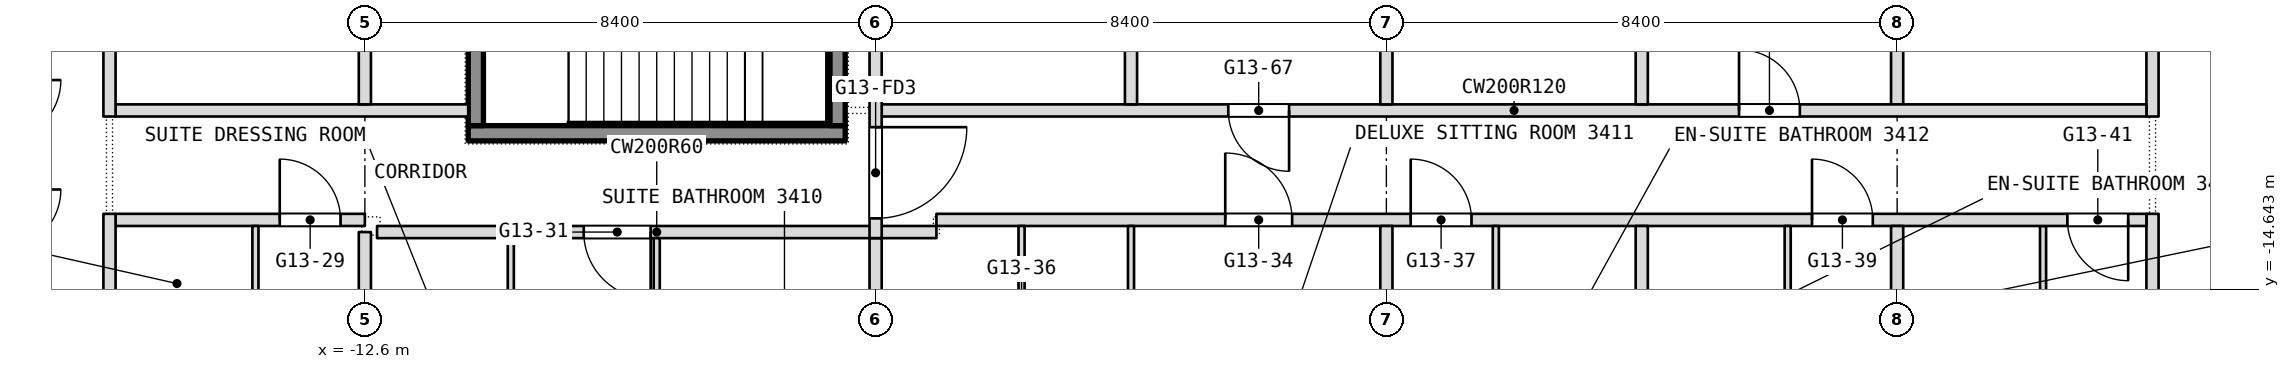
"""IFC4 building model, lengths in metres.
Left out: names, types, materials, properties, quantities, classifications, styles, units other than length and angle.
Written with IfcOpenShell. Run it as: python <this file> out.ifc"""

import sys

from ifc_helpers import new_model, si_unit, direction, frame, frame_2d, origin, place, context, subcontext, project, spatial, rectangle, extrude, element, fill, save


model = new_model("IFC4")
c1 = context("Model", 3, precision=1e-05, world=origin(), true_north=direction((0.0, 1.0)))
c2 = subcontext(c1, "Body", "Model", "MODEL_VIEW")
j1 = project(units=[si_unit("LENGTHUNIT", "METRE"), si_unit("PLANEANGLEUNIT", "RADIAN")], contexts=[c1])
p1 = place(None, origin())
s1 = spatial("IfcSite", under=j1, at=p1, CompositionType="ELEMENT")
p2 = place(p1, origin())
s2 = spatial("IfcBuilding", under=s1, at=p2, CompositionType="ELEMENT")
p3 = place(p2, frame((0.0, 0.0, 148.1)))
s3 = spatial("IfcBuildingStorey", under=s2, at=p3, CompositionType="ELEMENT", Elevation=148.1)
p4 = place(p3, frame((16.8, -22.186, 0.0), z_axis=(0.0, 0.0, 1.0), x_axis=(0.0, 1.0, 0.0)))
e1 = element("IfcWall", 1, at=p4, inside=s3, PredefinedType="PARTITIONING", context=c2, shape_type="SweptSolid", body=[
    extrude(rectangle(XDim=8.786, YDim=0.2, at=frame_2d((4.393, 0.0))), origin(), (0.0, 0.0, 1.0), 3.34),
])
p5 = place(p3, frame((16.8, -11.8, 0.0), z_axis=(0.0, 0.0, 1.0), x_axis=(0.0, 1.0, 0.0)))
e2 = element("IfcWall", 2, at=p5, inside=s3, PredefinedType="PARTITIONING", context=c2, shape_type="SweptSolid", body=[
    extrude(rectangle(XDim=9.9, YDim=0.2, at=frame_2d((4.95, 0.0))), origin(), (0.0, 0.0, 1.0), 3.34),
])
p6 = place(p3, frame((15.0, -16.85, 0.0), z_axis=(0.0, 0.0, 1.0), x_axis=(0.0, 1.0, 0.0)))
e3 = element("IfcWall", 3, at=p6, inside=s3, PredefinedType="PARTITIONING", context=c2, shape_type="SweptSolid", body=[
    extrude(rectangle(XDim=3.25, YDim=0.1, at=frame_2d((1.625, 0.0))), origin(), (0.0, 0.0, 1.0), 3.34),
])
p7 = place(p3, frame((-12.4, -13.7, 0.0), z_axis=(0.0, 0.0, 1.0), x_axis=(1.0, 0.0, 0.0)))
e4 = element("IfcWall", 4, at=p7, inside=s3, PredefinedType="PARTITIONING", context=c2, shape_type="SweptSolid", body=[
    extrude(rectangle(XDim=9.2, YDim=0.2, at=frame_2d((4.6, 0.0))), origin(), (0.0, 0.0, 1.0), 3.34),
])
p8 = place(p7, frame((3.4, 0.0, 0.0)))
e5 = element("IfcOpeningElement", 5, at=p8, cuts=e4, PredefinedType="OPENING", context=c2, shape_type="SweptSolid", body=[
    extrude(rectangle(XDim=1.1, YDim=2.1, at=frame_2d((0.55, 1.05))), frame((0.0, 0.1, 0.0), z_axis=(0.0, -1.0, 0.0), x_axis=(1.0, 0.0, 0.0)), (0.0, 0.0, 1.0), 0.2),
])
p9 = place(p3, frame((-16.7, -13.5, 0.0), z_axis=(0.0, 0.0, 1.0), x_axis=(1.0, 0.0, 0.0)))
e6 = element("IfcWall", 6, at=p9, inside=s3, PredefinedType="PARTITIONING", context=c2, shape_type="SweptSolid", body=[
    extrude(rectangle(XDim=4.1, YDim=0.2, at=frame_2d((2.05, 0.0))), origin(), (0.0, 0.0, 1.0), 3.34),
])
p10 = place(p9, frame((2.7, 0.0, 0.0)))
e7 = element("IfcOpeningElement", 7, at=p10, cuts=e6, PredefinedType="OPENING", context=c2, shape_type="SweptSolid", body=[
    extrude(rectangle(XDim=1.0, YDim=2.1, at=frame_2d((0.5, 1.05))), frame((0.0, 0.1, 0.0), z_axis=(0.0, -1.0, 0.0), x_axis=(1.0, 0.0, 0.0)), (0.0, 0.0, 1.0), 0.2),
])
p11 = place(p3, frame((-3.2, -13.5, 0.0), z_axis=(0.0, 0.0, 1.0), x_axis=(1.0, 0.0, 0.0)))
e8 = element("IfcWall", 8, at=p11, inside=s3, PredefinedType="PARTITIONING", context=c2, shape_type="SweptSolid", body=[
    extrude(rectangle(XDim=19.9, YDim=0.2, at=frame_2d((9.95, 0.0))), origin(), (0.0, 0.0, 1.0), 3.34),
])
p12 = place(p11, frame((4.75, 0.0, 0.0)))
e9 = element("IfcOpeningElement", 9, at=p12, cuts=e8, PredefinedType="OPENING", context=c2, shape_type="SweptSolid", body=[
    extrude(rectangle(XDim=1.1, YDim=2.1, at=frame_2d((0.55, 1.05))), frame((0.0, 0.1, 0.0), z_axis=(0.0, -1.0, 0.0), x_axis=(1.0, 0.0, 0.0)), (0.0, 0.0, 1.0), 0.2),
])
p13 = place(p11, frame((7.8, 0.0, 0.0)))
e10 = element("IfcOpeningElement", 10, at=p13, cuts=e8, PredefinedType="OPENING", context=c2, shape_type="SweptSolid", body=[
    extrude(rectangle(XDim=1.0, YDim=2.1, at=frame_2d((0.5, 1.05))), frame((0.0, 0.1, 0.0), z_axis=(0.0, -1.0, 0.0), x_axis=(1.0, 0.0, 0.0)), (0.0, 0.0, 1.0), 0.2),
])
p14 = place(p11, frame((14.4, 0.0, 0.0)))
e11 = element("IfcOpeningElement", 11, at=p14, cuts=e8, PredefinedType="OPENING", context=c2, shape_type="SweptSolid", body=[
    extrude(rectangle(XDim=1.0, YDim=2.1, at=frame_2d((0.5, 1.05))), frame((0.0, 0.1, 0.0), z_axis=(0.0, -1.0, 0.0), x_axis=(1.0, 0.0, 0.0)), (0.0, 0.0, 1.0), 0.2),
])
p15 = place(p11, frame((18.6, 0.0, 0.0)))
e12 = element("IfcOpeningElement", 12, at=p15, cuts=e8, PredefinedType="OPENING", context=c2, shape_type="SweptSolid", body=[
    extrude(rectangle(XDim=1.0, YDim=2.1, at=frame_2d((0.5, 1.05))), frame((0.0, 0.1, 0.0), z_axis=(0.0, -1.0, 0.0), x_axis=(1.0, 0.0, 0.0)), (0.0, 0.0, 1.0), 0.2),
])
p16 = place(p3, frame((12.6, -21.175, 0.0), z_axis=(0.0, 0.0, 1.0), x_axis=(0.0, 1.0, 0.0)))
e13 = element("IfcWall", 13, at=p16, inside=s3, PredefinedType="PARTITIONING", context=c2, shape_type="SweptSolid", body=[
    extrude(rectangle(XDim=7.575, YDim=0.2, at=frame_2d((3.788, 0.0))), origin(), (0.0, 0.0, 1.0), 3.34),
])
p17 = place(p3, frame((12.6, -11.6, 0.0), z_axis=(0.0, 0.0, 1.0), x_axis=(0.0, 1.0, 0.0)))
e14 = element("IfcWall", 14, at=p17, inside=s3, PredefinedType="PARTITIONING", context=c2, shape_type="SweptSolid", body=[
    extrude(rectangle(XDim=3.9, YDim=0.2, at=frame_2d((1.95, 0.0))), origin(), (0.0, 0.0, 1.0), 3.34),
])
p18 = place(p3, frame((-16.7, -11.7, 0.0), z_axis=(0.0, 0.0, 1.0), x_axis=(1.0, 0.0, 0.0)))
e15 = element("IfcWall", 15, at=p18, inside=s3, PredefinedType="PARTITIONING", context=c2, shape_type="SweptSolid", body=[
    extrude(rectangle(XDim=5.8, YDim=0.2, at=frame_2d((2.9, 0.0))), origin(), (0.0, 0.0, 1.0), 3.34),
])
p19 = place(p3, frame((-4.1, -11.7, 0.0), z_axis=(0.0, 0.0, 1.0), x_axis=(1.0, 0.0, 0.0)))
e16 = element("IfcWall", 16, at=p19, inside=s3, PredefinedType="PARTITIONING", context=c2, shape_type="SweptSolid", body=[
    extrude(rectangle(XDim=20.8, YDim=0.2, at=frame_2d((10.4, 0.0))), origin(), (0.0, 0.0, 1.0), 3.34),
])
p20 = place(p19, frame((14.1, 0.0, 0.0)))
e17 = element("IfcOpeningElement", 17, at=p20, cuts=e16, PredefinedType="OPENING", context=c2, shape_type="SweptSolid", body=[
    extrude(rectangle(XDim=1.0, YDim=2.1, at=frame_2d((0.5, 1.05))), frame((0.0, 0.1, 0.0), z_axis=(0.0, -1.0, 0.0), x_axis=(1.0, 0.0, 0.0)), (0.0, 0.0, 1.0), 0.2),
])
p21 = place(p19, frame((5.7, 0.0, 0.0)))
e18 = element("IfcOpeningElement", 18, at=p21, cuts=e16, PredefinedType="OPENING", context=c2, shape_type="SweptSolid", body=[
    extrude(rectangle(XDim=1.0, YDim=2.1, at=frame_2d((0.5, 1.05))), frame((0.0, 0.1, 0.0), z_axis=(0.0, -1.0, 0.0), x_axis=(1.0, 0.0, 0.0)), (0.0, 0.0, 1.0), 0.2),
])
p22 = place(p3, frame((10.8, -17.65, 0.0), z_axis=(0.0, 0.0, 1.0), x_axis=(0.0, 1.0, 0.0)))
e19 = element("IfcWall", 19, at=p22, inside=s3, PredefinedType="PARTITIONING", context=c2, shape_type="SweptSolid", body=[
    extrude(rectangle(XDim=4.05, YDim=0.1, at=frame_2d((2.025, 0.0))), origin(), (0.0, 0.0, 1.0), 3.34),
])
p23 = place(p3, frame((8.4, -23.3, 0.0), z_axis=(0.0, 0.0, 1.0), x_axis=(0.0, 1.0, 0.0)))
e20 = element("IfcWall", 20, at=p23, inside=s3, PredefinedType="PARTITIONING", context=c2, shape_type="SweptSolid", body=[
    extrude(rectangle(XDim=9.7, YDim=0.2, at=frame_2d((4.85, 0.0))), origin(), (0.0, 0.0, 1.0), 3.34),
])
p24 = place(p3, frame((8.4, -11.6, 0.0), z_axis=(0.0, 0.0, 1.0), x_axis=(0.0, 1.0, 0.0)))
e21 = element("IfcWall", 21, at=p24, inside=s3, PredefinedType="PARTITIONING", context=c2, shape_type="SweptSolid", body=[
    extrude(rectangle(XDim=3.8, YDim=0.2, at=frame_2d((1.9, 0.0))), origin(), (0.0, 0.0, 1.0), 3.34),
])
p25 = place(p3, frame((6.0, -17.75, 0.0), z_axis=(0.0, 0.0, 1.0), x_axis=(0.0, 1.0, 0.0)))
e22 = element("IfcWall", 22, at=p25, inside=s3, PredefinedType="PARTITIONING", context=c2, shape_type="SweptSolid", body=[
    extrude(rectangle(XDim=4.15, YDim=0.1, at=frame_2d((2.075, 0.0))), origin(), (0.0, 0.0, 1.0), 3.34),
])
p26 = place(p3, frame((4.2, -23.3, 0.0), z_axis=(0.0, 0.0, 1.0), x_axis=(0.0, 1.0, 0.0)))
e23 = element("IfcWall", 23, at=p26, inside=s3, PredefinedType="PARTITIONING", context=c2, shape_type="SweptSolid", body=[
    extrude(rectangle(XDim=9.7, YDim=0.2, at=frame_2d((4.85, 0.0))), origin(), (0.0, 0.0, 1.0), 3.34),
])
p27 = place(p3, frame((4.2, -11.6, 0.0), z_axis=(0.0, 0.0, 1.0), x_axis=(0.0, 1.0, 0.0)))
e24 = element("IfcWall", 24, at=p27, inside=s3, PredefinedType="PARTITIONING", context=c2, shape_type="SweptSolid", body=[
    extrude(rectangle(XDim=9.7, YDim=0.2, at=frame_2d((4.85, 0.0))), origin(), (0.0, 0.0, 1.0), 3.34),
])
p28 = place(p3, frame((0.0, -23.3, 0.0), z_axis=(0.0, 0.0, 1.0), x_axis=(0.0, 1.0, 0.0)))
e25 = element("IfcWall", 25, at=p28, inside=s3, PredefinedType="PARTITIONING", context=c2, shape_type="SweptSolid", body=[
    extrude(rectangle(XDim=9.7, YDim=0.1, at=frame_2d((4.85, 0.0))), origin(), (0.0, 0.0, 1.0), 3.34),
])
p29 = place(p28, frame((3.65, 0.0, 0.0)))
e26 = element("IfcOpeningElement", 26, at=p29, cuts=e25, PredefinedType="OPENING", context=c2, shape_type="SweptSolid", body=[
    extrude(rectangle(XDim=0.9, YDim=2.1, at=frame_2d((0.45, 1.05))), frame((0.0, 0.05, 0.0), z_axis=(0.0, -1.0, 0.0), x_axis=(1.0, 0.0, 0.0)), (0.0, 0.0, 1.0), 0.1),
])
p30 = place(p3, frame((0.0, -11.6, 0.0), z_axis=(0.0, 0.0, 1.0), x_axis=(0.0, 1.0, 0.0)))
e27 = element("IfcWall", 27, at=p30, inside=s3, PredefinedType="PARTITIONING", context=c2, shape_type="SweptSolid", body=[
    extrude(rectangle(XDim=9.7, YDim=0.2, at=frame_2d((4.85, 0.0))), origin(), (0.0, 0.0, 1.0), 3.34),
])
p31 = place(p3, frame((-1.8, -17.05, 0.0), z_axis=(0.0, 0.0, 1.0), x_axis=(0.0, 1.0, 0.0)))
e28 = element("IfcWall", 28, at=p31, inside=s3, PredefinedType="PARTITIONING", context=c2, shape_type="SweptSolid", body=[
    extrude(rectangle(XDim=3.45, YDim=0.1, at=frame_2d((1.725, 0.0))), origin(), (0.0, 0.0, 1.0), 3.34),
])
p32 = place(p31, frame((1.3, 0.0, 0.0)))
e29 = element("IfcOpeningElement", 29, at=p32, cuts=e28, PredefinedType="OPENING", context=c2, shape_type="SweptSolid", body=[
    extrude(rectangle(XDim=0.9, YDim=2.1, at=frame_2d((0.45, 1.05))), frame((0.0, 0.05, 0.0), z_axis=(0.0, -1.0, 0.0), x_axis=(1.0, 0.0, 0.0)), (0.0, 0.0, 1.0), 0.1),
])
p33 = place(p3, frame((-4.2, -23.3, 0.0), z_axis=(0.0, 0.0, 1.0), x_axis=(0.0, 1.0, 0.0)))
e30 = element("IfcWall", 30, at=p33, inside=s3, PredefinedType="PARTITIONING", context=c2, shape_type="SweptSolid", body=[
    extrude(rectangle(XDim=9.5, YDim=0.2, at=frame_2d((4.75, 0.0))), origin(), (0.0, 0.0, 1.0), 3.34),
])
p34 = place(p3, frame((-4.2, -13.8, 0.0), z_axis=(0.0, 0.0, 1.0), x_axis=(0.0, 1.0, 0.0)))
e31 = element("IfcWall", 31, at=p34, inside=s3, PredefinedType="PARTITIONING", context=c2, shape_type="SweptSolid", body=[
    extrude(rectangle(XDim=13.8, YDim=0.2, at=frame_2d((6.9, 0.0))), origin(), (0.0, 0.0, 1.0), 3.34),
])
p35 = place(p34, frame((12.15, 0.0, 0.0)))
e32 = element("IfcOpeningElement", 32, at=p35, cuts=e31, PredefinedType="OPENING", context=c2, shape_type="SweptSolid", body=[
    extrude(rectangle(XDim=1.5, YDim=2.1, at=frame_2d((0.75, 1.05))), frame((0.0, 0.1, 0.0), z_axis=(0.0, -1.0, 0.0), x_axis=(1.0, 0.0, 0.0)), (0.0, 0.0, 1.0), 0.2),
])
p36 = place(p34, frame((0.325, 0.0, 0.0)))
e33 = element("IfcOpeningElement", 33, at=p36, cuts=e31, PredefinedType="OPENING", context=c2, shape_type="SweptSolid", body=[
    extrude(rectangle(XDim=1.5, YDim=2.1, at=frame_2d((0.75, 1.05))), frame((0.0, 0.1, 0.0), z_axis=(0.0, -1.0, 0.0), x_axis=(1.0, 0.0, 0.0)), (0.0, 0.0, 1.0), 0.2),
])
p37 = place(p3, frame((-7.8, -17.35, 0.0), z_axis=(0.0, 0.0, 1.0), x_axis=(0.0, 1.0, 0.0)))
e34 = element("IfcWall", 34, at=p37, inside=s3, PredefinedType="PARTITIONING", context=c2, shape_type="SweptSolid", body=[
    extrude(rectangle(XDim=3.55, YDim=0.1, at=frame_2d((1.775, 0.0))), origin(), (0.0, 0.0, 1.0), 3.34),
])
p38 = place(p3, frame((-10.2, -17.25, 0.0), z_axis=(0.0, 0.0, 1.0), x_axis=(0.0, 1.0, 0.0)))
e35 = element("IfcWall", 35, at=p38, inside=s3, PredefinedType="PARTITIONING", context=c2, shape_type="SweptSolid", body=[
    extrude(rectangle(XDim=3.45, YDim=0.1, at=frame_2d((1.725, 0.0))), origin(), (0.0, 0.0, 1.0), 3.34),
])
p39 = place(p3, frame((-12.6, -21.175, 0.0), z_axis=(0.0, 0.0, 1.0), x_axis=(0.0, 1.0, 0.0)))
e36 = element("IfcWall", 36, at=p39, inside=s3, PredefinedType="PARTITIONING", context=c2, shape_type="SweptSolid", body=[
    extrude(rectangle(XDim=7.475, YDim=0.2, at=frame_2d((3.738, 0.0))), origin(), (0.0, 0.0, 1.0), 3.34),
])
p40 = place(p3, frame((-12.6, -11.6, 0.0), z_axis=(0.0, 0.0, 1.0), x_axis=(0.0, 1.0, 0.0)))
e37 = element("IfcWall", 37, at=p40, inside=s3, PredefinedType="PARTITIONING", context=c2, shape_type="SweptSolid", body=[
    extrude(rectangle(XDim=9.7, YDim=0.2, at=frame_2d((4.85, 0.0))), origin(), (0.0, 0.0, 1.0), 3.34),
])
p41 = place(p3, frame((-14.4, -16.45, 0.0), z_axis=(0.0, 0.0, 1.0), x_axis=(0.0, 1.0, 0.0)))
e38 = element("IfcWall", 38, at=p41, inside=s3, PredefinedType="PARTITIONING", context=c2, shape_type="SweptSolid", body=[
    extrude(rectangle(XDim=2.85, YDim=0.1, at=frame_2d((1.425, 0.0))), origin(), (0.0, 0.0, 1.0), 3.34),
])
p42 = place(p3, frame((-16.8, -22.186, 0.0), z_axis=(0.0, 0.0, 1.0), x_axis=(0.0, 1.0, 0.0)))
e39 = element("IfcWall", 39, at=p42, inside=s3, PredefinedType="PARTITIONING", context=c2, shape_type="SweptSolid", body=[
    extrude(rectangle(XDim=8.786, YDim=0.2, at=frame_2d((4.393, 0.0))), origin(), (0.0, 0.0, 1.0), 3.34),
])
p43 = place(p3, frame((-16.8, -11.8, 0.0), z_axis=(0.0, 0.0, 1.0), x_axis=(0.0, 1.0, 0.0)))
e40 = element("IfcWall", 40, at=p43, inside=s3, PredefinedType="PARTITIONING", context=c2, shape_type="SweptSolid", body=[
    extrude(rectangle(XDim=9.9, YDim=0.2, at=frame_2d((4.95, 0.0))), origin(), (0.0, 0.0, 1.0), 3.34),
])
p44 = place(p3, frame((-10.9, -12.075, 0.1), z_axis=(0.0, 0.0, 1.0), x_axis=(1.0, 0.0, 0.0)))
e41 = element("IfcWall", 41, at=p44, inside=s3, PredefinedType="SHEAR", context=c2, shape_type="SweptSolid", body=[
    extrude(rectangle(XDim=6.2, YDim=0.25, at=frame_2d((3.1, 0.0))), origin(), (0.0, 0.0, 1.0), 3.6),
])
for number, where, z_axis, x_axis in (
    (42, (-10.775, -11.95, 0.1), (0.0, 0.0, 1.0), (0.0, 1.0, 0.0)),
    (43, (-4.825, -11.95, 0.1), (0.0, 0.0, 1.0), (0.0, 1.0, 0.0)),
):
    element("IfcWall", number, at=place(p3, frame(where, z_axis=z_axis, x_axis=x_axis)), inside=s3, PredefinedType="SHEAR", context=c2, shape_type="SweptSolid", body=[
        extrude(rectangle(XDim=2.9, YDim=0.25, at=frame_2d((1.45, 0.0))), origin(), (0.0, 0.0, 1.0), 3.6),
    ])
p45 = place(p8, origin())
e44 = element("IfcDoor", 44, at=p45, inside=s3, OperationType="SINGLE_SWING_LEFT", PredefinedType="DOOR", context=c2, shape_type="SweptSolid", body=[
    extrude(rectangle(XDim=1.1, YDim=2.1, at=frame_2d((0.55, 1.05))), frame((0.0, 0.025, 0.0), z_axis=(0.0, -1.0, 0.0), x_axis=(1.0, 0.0, 0.0)), (0.0, 0.0, 1.0), 0.05),
])
fill(e5, e44)
p46 = place(p10, origin())
e45 = element("IfcDoor", 45, at=p46, inside=s3, OperationType="SINGLE_SWING_LEFT", PredefinedType="DOOR", context=c2, shape_type="SweptSolid", body=[
    extrude(rectangle(XDim=1.0, YDim=2.1, at=frame_2d((0.5, 1.05))), frame((0.0, 0.025, 0.0), z_axis=(0.0, -1.0, 0.0), x_axis=(1.0, 0.0, 0.0)), (0.0, 0.0, 1.0), 0.05),
])
fill(e7, e45)
p47 = place(p12, origin())
e46 = element("IfcDoor", 46, at=p47, inside=s3, OperationType="SINGLE_SWING_RIGHT", PredefinedType="DOOR", context=c2, shape_type="SweptSolid", body=[
    extrude(rectangle(XDim=1.1, YDim=2.1, at=frame_2d((0.55, 1.05))), frame((0.0, 0.025, 0.0), z_axis=(0.0, -1.0, 0.0), x_axis=(1.0, 0.0, 0.0)), (0.0, 0.0, 1.0), 0.05),
])
fill(e9, e46)
p48 = place(p13, origin())
e47 = element("IfcDoor", 47, at=p48, inside=s3, OperationType="SINGLE_SWING_LEFT", PredefinedType="DOOR", context=c2, shape_type="SweptSolid", body=[
    extrude(rectangle(XDim=1.0, YDim=2.1, at=frame_2d((0.5, 1.05))), frame((0.0, 0.025, 0.0), z_axis=(0.0, -1.0, 0.0), x_axis=(1.0, 0.0, 0.0)), (0.0, 0.0, 1.0), 0.05),
])
fill(e10, e47)
p49 = place(p14, origin())
e48 = element("IfcDoor", 48, at=p49, inside=s3, OperationType="SINGLE_SWING_LEFT", PredefinedType="DOOR", context=c2, shape_type="SweptSolid", body=[
    extrude(rectangle(XDim=1.0, YDim=2.1, at=frame_2d((0.5, 1.05))), frame((0.0, 0.025, 0.0), z_axis=(0.0, -1.0, 0.0), x_axis=(1.0, 0.0, 0.0)), (0.0, 0.0, 1.0), 0.05),
])
fill(e11, e48)
p50 = place(p15, origin())
e49 = element("IfcDoor", 49, at=p50, inside=s3, OperationType="SINGLE_SWING_LEFT", PredefinedType="DOOR", context=c2, shape_type="SweptSolid", body=[
    extrude(rectangle(XDim=1.0, YDim=2.1, at=frame_2d((0.5, 1.05))), frame((0.0, 0.025, 0.0), z_axis=(0.0, -1.0, 0.0), x_axis=(1.0, 0.0, 0.0)), (0.0, 0.0, 1.0), 0.05),
])
fill(e12, e49)
p51 = place(p20, origin())
e50 = element("IfcDoor", 50, at=p51, inside=s3, OperationType="SINGLE_SWING_LEFT", PredefinedType="DOOR", context=c2, shape_type="SweptSolid", body=[
    extrude(rectangle(XDim=1.0, YDim=2.1, at=frame_2d((0.5, 1.05))), frame((0.0, 0.025, 0.0), z_axis=(0.0, -1.0, 0.0), x_axis=(1.0, 0.0, 0.0)), (0.0, 0.0, 1.0), 0.05),
])
fill(e17, e50)
p52 = place(p21, origin())
e51 = element("IfcDoor", 51, at=p52, inside=s3, OperationType="SINGLE_SWING_LEFT", PredefinedType="DOOR", context=c2, shape_type="SweptSolid", body=[
    extrude(rectangle(XDim=1.0, YDim=2.1, at=frame_2d((0.5, 1.05))), frame((0.0, 0.025, 0.0), z_axis=(0.0, -1.0, 0.0), x_axis=(1.0, 0.0, 0.0)), (0.0, 0.0, 1.0), 0.05),
])
fill(e18, e51)
p53 = place(p36, origin())
e52 = element("IfcDoor", 52, at=p53, inside=s3, OperationType="DOUBLE_DOOR_DOUBLE_SWING", PredefinedType="DOOR", context=c2, shape_type="SweptSolid", body=[
    extrude(rectangle(XDim=1.5, YDim=2.1, at=frame_2d((0.75, 1.05))), frame((0.0, 0.025, 0.0), z_axis=(0.0, -1.0, 0.0), x_axis=(1.0, 0.0, 0.0)), (0.0, 0.0, 1.0), 0.05),
])
fill(e33, e52)
save(model, sys.argv[1])
